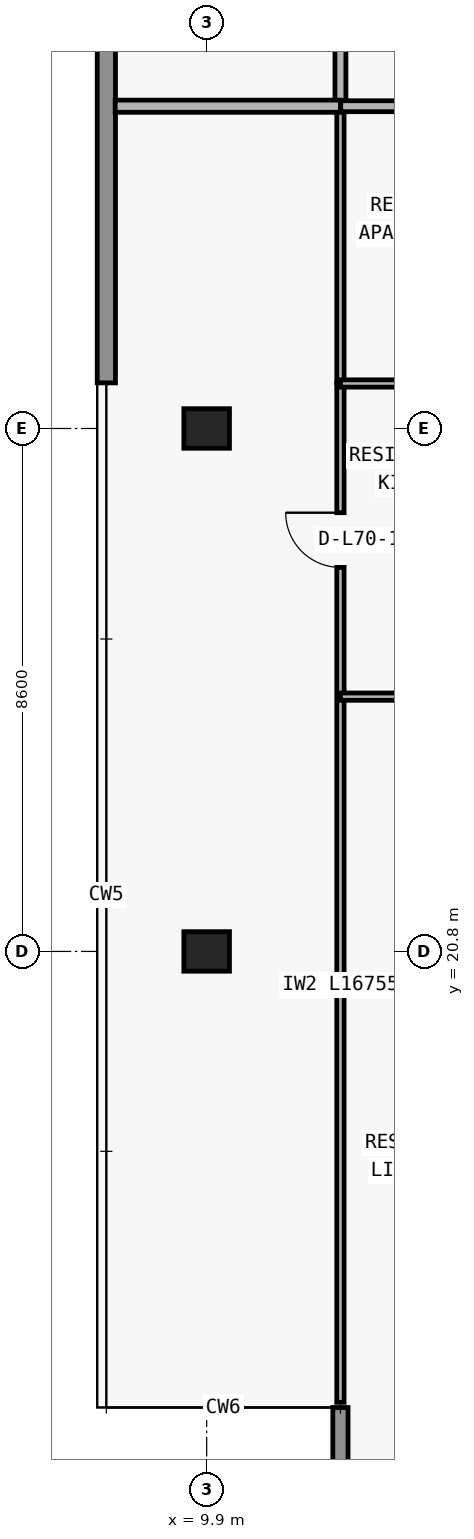
"""IFC4 building model, lengths in metres.
Left out: names, types, materials, properties, quantities, classifications, styles, units other than length and angle.
Written with IfcOpenShell. Run it as: python <this file> out.ifc"""

import sys

from ifc_helpers import new_model, si_unit, direction, frame, frame_2d, origin, origin_2d, place, context, subcontext, project, spatial, rectangle, extrude, element, fill, save


model = new_model("IFC4")
c1 = context("Model", 3, precision=1e-05, world=origin(), true_north=direction((0.0, 1.0)))
c2 = subcontext(c1, "Body", "Model", "MODEL_VIEW")
j1 = project(units=[si_unit("LENGTHUNIT", "METRE"), si_unit("PLANEANGLEUNIT", "RADIAN")], contexts=[c1])
p1 = place(None, origin())
s1 = spatial("IfcSite", under=j1, at=p1, CompositionType="ELEMENT")
p2 = place(p1, origin())
s2 = spatial("IfcBuilding", under=s1, at=p2, CompositionType="ELEMENT")
p3 = place(p2, frame((0.0, 0.0, 249.6)))
s3 = spatial("IfcBuildingStorey", under=s2, at=p3, CompositionType="ELEMENT", Elevation=249.6)
for number, where, z_axis, x_axis in (
    (1, (9.9, 20.8, 0.0), (0.0, 0.0, 1.0), (1.0, 0.0, 0.0)),
    (2, (9.9, 29.4, 0.0), (0.0, 0.0, 1.0), (1.0, 0.0, 0.0)),
):
    element("IfcColumn", number, at=place(p3, frame(where, z_axis=z_axis, x_axis=x_axis)), inside=s3, PredefinedType="COLUMN", context=c2, shape_type="SweptSolid", body=[
        extrude(rectangle(XDim=0.75, YDim=0.65, at=origin_2d()), origin(), (0.0, 0.0, 1.0), 3.05),
    ])
p4 = place(p3, frame((12.1, 13.3, 0.0), z_axis=(0.0, 0.0, 1.0), x_axis=(0.0, -1.0, 0.0)))
e3 = element("IfcWall", 3, at=p4, inside=s3, PredefinedType="ELEMENTEDWALL", context=c2, shape_type="SweptSolid", body=[
    extrude(rectangle(XDim=3.45, YDim=0.25, at=frame_2d((1.725, 0.0))), origin(), (0.0, 0.0, 1.0), 3.05),
])
p5 = place(p3, frame((8.25, 30.15, 0.0), z_axis=(0.0, 0.0, 1.0), x_axis=(0.0, 1.0, 0.0)))
e4 = element("IfcWall", 4, at=p5, inside=s3, PredefinedType="STANDARD", context=c2, shape_type="SweptSolid", body=[
    extrude(rectangle(XDim=16.85, YDim=0.3, at=frame_2d((8.425, 0.0))), origin(), (0.0, 0.0, 1.0), 3.05),
])
p6 = place(p3, frame((12.1, 13.385, 0.0), z_axis=(0.0, 0.0, 1.0), x_axis=(0.0, 1.0, 0.0)))
e5 = element("IfcWall", 5, at=p6, inside=s3, PredefinedType="PARTITIONING", context=c2, shape_type="SweptSolid", body=[
    extrude(rectangle(XDim=16.755, YDim=0.12, at=frame_2d((8.377, 0.0))), origin(), (0.0, 0.0, 1.0), 2.578),
])
p7 = place(p6, frame((13.73, 0.0, 0.0)))
e6 = element("IfcOpeningElement", 6, at=p7, cuts=e5, PredefinedType="OPENING", context=c2, shape_type="SweptSolid", body=[
    extrude(rectangle(XDim=0.9, YDim=2.15, at=frame_2d((0.45, 1.075))), frame((0.0, 0.07, 0.0), z_axis=(0.0, -1.0, 0.0), x_axis=(1.0, 0.0, 0.0)), (0.0, 0.0, 1.0), 0.14),
])
p8 = place(p3, frame((12.1, 30.15, 0.0), z_axis=(0.0, 0.0, 1.0), x_axis=(0.0, 1.0, 0.0)))
e7 = element("IfcWall", 7, at=p8, inside=s3, PredefinedType="PARTITIONING", context=c2, shape_type="SweptSolid", body=[
    extrude(rectangle(XDim=4.55, YDim=0.12, at=frame_2d((2.275, 0.0))), origin(), (0.0, 0.0, 1.0), 2.578),
])
p9 = place(p3, frame((12.1, 34.705, 0.0), z_axis=(0.0, 0.0, 1.0), x_axis=(0.0, 1.0, 0.0)))
e8 = element("IfcWall", 8, at=p9, inside=s3, PredefinedType="PARTITIONING", context=c2, shape_type="SweptSolid", body=[
    extrude(rectangle(XDim=2.295, YDim=0.18, at=frame_2d((1.147, 0.0))), origin(), (0.0, 0.0, 1.0), 2.578),
])
p10 = place(p3, frame((12.1, 24.99, 0.0), z_axis=(0.0, 0.0, 1.0), x_axis=(1.0, 0.0, 0.0)))
e9 = element("IfcWall", 9, at=p10, inside=s3, PredefinedType="PARTITIONING", context=c2, shape_type="SweptSolid", body=[
    extrude(rectangle(XDim=6.2, YDim=0.12, at=frame_2d((3.1, 0.0))), origin(), (0.0, 0.0, 1.0), 3.05),
])
p11 = place(p10, frame((1.1, 0.0, 0.0)))
e10 = element("IfcOpeningElement", 10, at=p11, cuts=e9, PredefinedType="OPENING", context=c2, shape_type="SweptSolid", body=[
    extrude(rectangle(XDim=0.9, YDim=2.15, at=frame_2d((0.45, 1.075))), frame((0.0, 0.07, 0.0), z_axis=(0.0, -1.0, 0.0), x_axis=(1.0, 0.0, 0.0)), (0.0, 0.0, 1.0), 0.14),
])
p12 = place(p10, frame((4.324, 0.0, 0.0)))
e11 = element("IfcOpeningElement", 11, at=p12, cuts=e9, PredefinedType="OPENING", context=c2, shape_type="SweptSolid", body=[
    extrude(rectangle(XDim=0.9, YDim=2.15, at=frame_2d((0.45, 1.075))), frame((0.0, 0.07, 0.0), z_axis=(0.0, -1.0, 0.0), x_axis=(1.0, 0.0, 0.0)), (0.0, 0.0, 1.0), 0.14),
])
p13 = place(p3, frame((12.1, 30.14, 0.0), z_axis=(0.0, 0.0, 1.0), x_axis=(1.0, 0.0, 0.0)))
e12 = element("IfcWall", 12, at=p13, inside=s3, PredefinedType="PARTITIONING", context=c2, shape_type="SweptSolid", body=[
    extrude(rectangle(XDim=6.2, YDim=0.12, at=frame_2d((3.1, 0.0))), origin(), (0.0, 0.0, 1.0), 3.05),
])
p14 = place(p13, frame((1.224, 0.0, 0.0)))
e13 = element("IfcOpeningElement", 13, at=p14, cuts=e12, PredefinedType="OPENING", context=c2, shape_type="SweptSolid", body=[
    extrude(rectangle(XDim=0.9, YDim=2.15, at=frame_2d((0.45, 1.075))), frame((0.0, 0.07, 0.0), z_axis=(0.0, -1.0, 0.0), x_axis=(1.0, 0.0, 0.0)), (0.0, 0.0, 1.0), 0.14),
])
p15 = place(p3, frame((8.395, 34.7, 0.0), z_axis=(0.0, 0.0, 1.0), x_axis=(1.0, 0.0, 0.0)))
e14 = element("IfcWall", 14, at=p15, inside=s3, PredefinedType="PARTITIONING", context=c2, shape_type="SweptSolid", body=[
    extrude(rectangle(XDim=3.705, YDim=0.2, at=frame_2d((1.853, 0.0))), origin(), (0.0, 0.0, 1.0), 3.05),
])
p16 = place(p3, frame((12.105, 34.7, 0.0), z_axis=(0.0, 0.0, 1.0), x_axis=(1.0, 0.0, 0.0)))
e15 = element("IfcWall", 15, at=p16, inside=s3, PredefinedType="PARTITIONING", context=c2, shape_type="SweptSolid", body=[
    extrude(rectangle(XDim=14.545, YDim=0.18, at=frame_2d((7.272, 0.0))), origin(), (0.0, 0.0, 1.0), 3.05),
])
p17 = place(p16, frame((1.545, 0.0, 0.0)))
e16 = element("IfcOpeningElement", 16, at=p17, cuts=e15, PredefinedType="OPENING", context=c2, shape_type="SweptSolid", body=[
    extrude(rectangle(XDim=1.0, YDim=2.2, at=frame_2d((0.5, 1.1))), frame((0.0, 0.1, 0.0), z_axis=(0.0, -1.0, 0.0), x_axis=(1.0, 0.0, 0.0)), (0.0, 0.0, 1.0), 0.2),
])
p18 = place(p16, frame((8.691, 0.0, 0.0)))
e17 = element("IfcOpeningElement", 17, at=p18, cuts=e15, PredefinedType="OPENING", context=c2, shape_type="SweptSolid", body=[
    extrude(rectangle(XDim=1.0, YDim=2.2, at=frame_2d((0.5, 1.1))), frame((0.0, 0.1, 0.0), z_axis=(0.0, -1.0, 0.0), x_axis=(1.0, 0.0, 0.0)), (0.0, 0.0, 1.0), 0.2),
])
p19 = place(p7, origin())
e18 = element("IfcDoor", 18, at=p19, inside=s3, OperationType="SINGLE_SWING_RIGHT", PredefinedType="DOOR", context=c2, shape_type="SweptSolid", body=[
    extrude(rectangle(XDim=0.9, YDim=2.15, at=frame_2d((0.45, 1.075))), frame((0.0, 0.025, 0.0), z_axis=(0.0, -1.0, 0.0), x_axis=(1.0, 0.0, 0.0)), (0.0, 0.0, 1.0), 0.05),
])
fill(e6, e18)
save(model, sys.argv[1])
